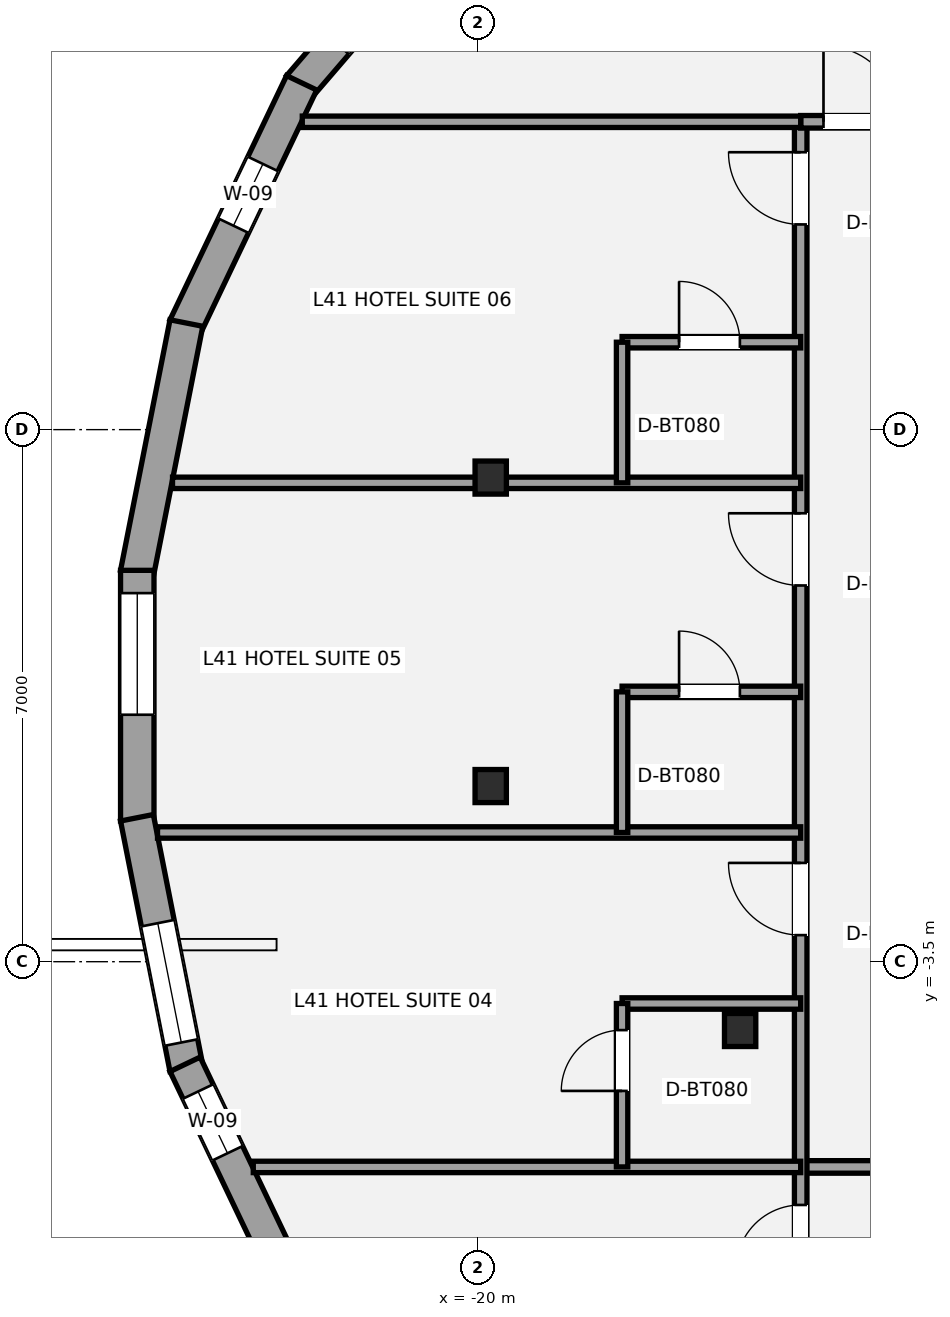
"""IFC4 building model, lengths in metres.
Left out: names, types, materials, properties, quantities, classifications, styles, units other than length and angle.
Written with IfcOpenShell. Run it as: python <this file> out.ifc"""

import sys

from ifc_helpers import new_model, si_unit, direction, frame, frame_2d, origin, origin_2d, place, context, subcontext, project, spatial, rectangle, i_section, extrude, element, fill, save


model = new_model("IFC4")
c1 = context("Model", 3, precision=1e-05, world=origin(), true_north=direction((0.0, 1.0)))
c2 = subcontext(c1, "Body", "Model", "MODEL_VIEW")
j1 = project(units=[si_unit("LENGTHUNIT", "METRE"), si_unit("PLANEANGLEUNIT", "RADIAN")], contexts=[c1])
p1 = place(None, origin())
s1 = spatial("IfcSite", under=j1, at=p1, CompositionType="ELEMENT")
p2 = place(p1, origin())
s2 = spatial("IfcBuilding", under=s1, at=p2, CompositionType="ELEMENT")
p3 = place(p2, frame((0.0, 0.0, 153.4)))
s3 = spatial("IfcBuildingStorey", under=s2, at=p3, CompositionType="ELEMENT", Elevation=153.4)
for number, where, z_axis, x_axis in (
    (1, (-19.828, 2.869, 0.0), (0.0, 0.0, 1.0), (1.0, 0.0, 0.0)),
    (2, (-19.828, -1.189, 0.0), (0.0, 0.0, 1.0), (1.0, 0.0, 0.0)),
    (3, (-16.547, -4.398, 0.0), (0.0, 0.0, 1.0), (1.0, 0.0, 0.0)),
):
    element("IfcColumn", number, at=place(p3, frame(where, z_axis=z_axis, x_axis=x_axis)), inside=s3, PredefinedType="COLUMN", context=c2, shape_type="SweptSolid", body=[
        extrude(i_section(OverallWidth=0.412, OverallDepth=0.435, WebThickness=0.036, FlangeThickness=0.057, at=origin_2d()), origin(), (0.0, 0.0, 1.0), 3.2),
    ])
p4 = place(p3, frame((-22.347, 8.014, 0.0), z_axis=(0.0, 0.0, 1.0), x_axis=(0.651797156524, 0.758393345664, 0.0)))
e4 = element("IfcWall", 4, at=p4, inside=s3, PredefinedType="STANDARD", context=c2, shape_type="SweptSolid", body=[
    extrude(rectangle(XDim=3.896, YDim=0.44, at=frame_2d((1.948, 0.0))), origin(), (0.0, 0.0, 1.0), 2.315),
])
p5 = place(p4, frame((0.749, 0.0, 0.58)))
e5 = element("IfcOpeningElement", 5, at=p5, cuts=e4, PredefinedType="OPENING", context=c2, shape_type="SweptSolid", body=[
    extrude(rectangle(XDim=1.6, YDim=1.55, at=frame_2d((0.8, 0.775))), frame((0.0, 0.23, 0.0), z_axis=(0.0, -1.0, 0.0), x_axis=(1.0, 0.0, 0.0)), (0.0, 0.0, 1.0), 0.46),
])
p6 = place(p3, frame((-23.85, 4.85, 0.0), z_axis=(0.0, 0.0, 1.0), x_axis=(0.430899691529, 0.902399831472, 0.0)))
e6 = element("IfcWall", 6, at=p6, inside=s3, PredefinedType="STANDARD", context=c2, shape_type="SweptSolid", body=[
    extrude(rectangle(XDim=3.56, YDim=0.44, at=frame_2d((1.78, 0.0))), origin(), (0.0, 0.0, 1.0), 2.315),
])
p7 = place(p6, frame((1.477, 0.0, 0.58)))
e7 = element("IfcOpeningElement", 7, at=p7, cuts=e6, PredefinedType="OPENING", context=c2, shape_type="SweptSolid", body=[
    extrude(rectangle(XDim=0.9, YDim=1.35, at=frame_2d((0.45, 0.675))), frame((0.0, 0.23, 0.0), z_axis=(0.0, -1.0, 0.0), x_axis=(1.0, 0.0, 0.0)), (0.0, 0.0, 1.0), 0.46),
])
p8 = place(p3, frame((-24.483, 1.606, 0.0), z_axis=(0.0, 0.0, 1.0), x_axis=(0.193669845908, 0.981066761635, 0.0)))
e8 = element("IfcWall", 8, at=p8, inside=s3, PredefinedType="STANDARD", context=c2, shape_type="SweptSolid", body=[
    extrude(rectangle(XDim=3.36, YDim=0.44, at=frame_2d((1.68, 0.0))), origin(), (0.0, 0.0, 1.0), 2.315),
])
p9 = place(p3, frame((-24.479, -1.649, 0.0), z_axis=(0.0, 0.0, 1.0), x_axis=(0.0, 1.0, 0.0)))
e9 = element("IfcWall", 9, at=p9, inside=s3, PredefinedType="STANDARD", context=c2, shape_type="SweptSolid", body=[
    extrude(rectangle(XDim=3.298, YDim=0.44, at=frame_2d((1.649, 0.0))), origin(), (0.0, 0.0, 1.0), 2.315),
])
p10 = place(p9, frame((1.398, 0.0, 0.58)))
e10 = element("IfcOpeningElement", 10, at=p10, cuts=e9, PredefinedType="OPENING", context=c2, shape_type="SweptSolid", body=[
    extrude(rectangle(XDim=1.6, YDim=1.55, at=frame_2d((0.8, 0.775))), frame((0.0, 0.23, 0.0), z_axis=(0.0, -1.0, 0.0), x_axis=(1.0, 0.0, 0.0)), (0.0, 0.0, 1.0), 0.46),
])
p11 = place(p3, frame((-23.832, -4.902, 0.0), z_axis=(0.0, 0.0, 1.0), x_axis=(-0.193669845908, 0.981066761635, 0.0)))
e11 = element("IfcWall", 11, at=p11, inside=s3, PredefinedType="STANDARD", context=c2, shape_type="SweptSolid", body=[
    extrude(rectangle(XDim=3.36, YDim=0.44, at=frame_2d((1.68, 0.0))), origin(), (0.0, 0.0, 1.0), 2.315),
])
p12 = place(p11, frame((0.346, 0.0, 0.58)))
e12 = element("IfcOpeningElement", 12, at=p12, cuts=e11, PredefinedType="OPENING", context=c2, shape_type="SweptSolid", body=[
    extrude(rectangle(XDim=1.6, YDim=1.55, at=frame_2d((0.8, 0.775))), frame((0.0, 0.23, 0.0), z_axis=(0.0, -1.0, 0.0), x_axis=(1.0, 0.0, 0.0)), (0.0, 0.0, 1.0), 0.46),
])
p13 = place(p3, frame((-22.316, -8.062, 0.0), z_axis=(0.0, 0.0, 1.0), x_axis=(-0.430899691529, 0.902399831472, 0.0)))
e13 = element("IfcWall", 13, at=p13, inside=s3, PredefinedType="STANDARD", context=c2, shape_type="SweptSolid", body=[
    extrude(rectangle(XDim=3.56, YDim=0.44, at=frame_2d((1.78, 0.0))), origin(), (0.0, 0.0, 1.0), 2.315),
])
p14 = place(p13, frame((2.263, 0.0, 0.58)))
e14 = element("IfcOpeningElement", 14, at=p14, cuts=e13, PredefinedType="OPENING", context=c2, shape_type="SweptSolid", body=[
    extrude(rectangle(XDim=0.9, YDim=1.35, at=frame_2d((0.45, 0.675))), frame((0.0, 0.23, 0.0), z_axis=(0.0, -1.0, 0.0), x_axis=(1.0, 0.0, 0.0)), (0.0, 0.0, 1.0), 0.46),
])
p15 = place(p3, frame((-15.75, -6.2, 0.0), z_axis=(0.0, 0.0, 1.0), x_axis=(1.0, 0.0, 0.0)))
e15 = element("IfcWall", 15, at=p15, inside=s3, PredefinedType="PARTITIONING", context=c2, shape_type="SweptSolid", body=[
    extrude(rectangle(XDim=31.3, YDim=0.165, at=frame_2d((15.65, 0.0))), origin(), (0.0, 0.0, 1.0), 2.398),
])
p16 = place(p15, frame((8.12, 0.0, 0.0)))
e16 = element("IfcOpeningElement", 16, at=p16, cuts=e15, PredefinedType="OPENING", context=c2, shape_type="SweptSolid", body=[
    extrude(rectangle(XDim=0.95, YDim=2.15, at=frame_2d((0.475, 1.075))), frame((0.0, 0.093, 0.0), z_axis=(0.0, -1.0, 0.0), x_axis=(1.0, 0.0, 0.0)), (0.0, 0.0, 1.0), 0.185),
])
p17 = place(p15, frame((19.6, 0.0, 0.0)))
e17 = element("IfcOpeningElement", 17, at=p17, cuts=e15, PredefinedType="OPENING", context=c2, shape_type="SweptSolid", body=[
    extrude(rectangle(XDim=0.95, YDim=2.15, at=frame_2d((0.475, 1.075))), frame((0.0, 0.093, 0.0), z_axis=(0.0, -1.0, 0.0), x_axis=(1.0, 0.0, 0.0)), (0.0, 0.0, 1.0), 0.185),
])
p18 = place(p15, frame((29.95, 0.0, 0.0)))
e18 = element("IfcOpeningElement", 18, at=p18, cuts=e15, PredefinedType="OPENING", context=c2, shape_type="SweptSolid", body=[
    extrude(rectangle(XDim=0.95, YDim=2.15, at=frame_2d((0.475, 1.075))), frame((0.0, 0.093, 0.0), z_axis=(0.0, -1.0, 0.0), x_axis=(1.0, 0.0, 0.0)), (0.0, 0.0, 1.0), 0.185),
])
p19 = place(p3, frame((-15.75, -13.312, 0.0), z_axis=(0.0, 0.0, 1.0), x_axis=(0.0, 1.0, 0.0)))
e19 = element("IfcWall", 19, at=p19, inside=s3, PredefinedType="PARTITIONING", context=c2, shape_type="SweptSolid", body=[
    extrude(rectangle(XDim=20.862, YDim=0.165, at=frame_2d((10.431, 0.0))), origin(), (0.0, 0.0, 1.0), 2.473),
])
p20 = place(p19, frame((5.762, 0.0, 0.0)))
e20 = element("IfcOpeningElement", 20, at=p20, cuts=e19, PredefinedType="OPENING", context=c2, shape_type="SweptSolid", body=[
    extrude(rectangle(XDim=0.85, YDim=2.1, at=frame_2d((0.425, 1.05))), frame((0.0, 0.093, 0.0), z_axis=(0.0, -1.0, 0.0), x_axis=(1.0, 0.0, 0.0)), (0.0, 0.0, 1.0), 0.185),
])
p21 = place(p19, frame((10.162, 0.0, 0.0)))
e21 = element("IfcOpeningElement", 21, at=p21, cuts=e19, PredefinedType="OPENING", context=c2, shape_type="SweptSolid", body=[
    extrude(rectangle(XDim=0.95, YDim=2.15, at=frame_2d((0.475, 1.075))), frame((0.0, 0.093, 0.0), z_axis=(0.0, -1.0, 0.0), x_axis=(1.0, 0.0, 0.0)), (0.0, 0.0, 1.0), 0.185),
])
p22 = place(p19, frame((14.762, 0.0, 0.0)))
e22 = element("IfcOpeningElement", 22, at=p22, cuts=e19, PredefinedType="OPENING", context=c2, shape_type="SweptSolid", body=[
    extrude(rectangle(XDim=0.95, YDim=2.15, at=frame_2d((0.475, 1.075))), frame((0.0, 0.093, 0.0), z_axis=(0.0, -1.0, 0.0), x_axis=(1.0, 0.0, 0.0)), (0.0, 0.0, 1.0), 0.185),
])
p23 = place(p19, frame((19.512, 0.0, 0.0)))
e23 = element("IfcOpeningElement", 23, at=p23, cuts=e19, PredefinedType="OPENING", context=c2, shape_type="SweptSolid", body=[
    extrude(rectangle(XDim=0.95, YDim=2.15, at=frame_2d((0.475, 1.075))), frame((0.0, 0.093, 0.0), z_axis=(0.0, -1.0, 0.0), x_axis=(1.0, 0.0, 0.0)), (0.0, 0.0, 1.0), 0.185),
])
p24 = place(p3, frame((-15.75, 7.55, 0.0), z_axis=(0.0, 0.0, 1.0), x_axis=(1.0, 0.0, 0.0)))
e24 = element("IfcWall", 24, at=p24, inside=s3, PredefinedType="PARTITIONING", context=c2, shape_type="SweptSolid", body=[
    extrude(rectangle(XDim=1.95, YDim=0.165, at=frame_2d((0.975, 0.0))), origin(), (0.0, 0.0, 1.0), 3.02),
])
p25 = place(p24, frame((0.3, 0.0, 0.0)))
e25 = element("IfcOpeningElement", 25, at=p25, cuts=e24, PredefinedType="OPENING", context=c2, shape_type="SweptSolid", body=[
    extrude(rectangle(XDim=1.0, YDim=2.15, at=frame_2d((0.5, 1.075))), frame((0.0, 0.093, 0.0), z_axis=(0.0, -1.0, 0.0), x_axis=(1.0, 0.0, 0.0)), (0.0, 0.0, 1.0), 0.185),
])
p26 = place(p3, frame((-22.308, 7.55, 0.0), z_axis=(0.0, 0.0, 1.0), x_axis=(1.0, 0.0, 0.0)))
e26 = element("IfcWall", 26, at=p26, inside=s3, PredefinedType="PLUMBINGWALL", context=c2, shape_type="SweptSolid", body=[
    extrude(rectangle(XDim=6.558, YDim=0.15, at=frame_2d((3.279, 0.0))), origin(), (0.0, 0.0, 1.0), 2.473),
])
p27 = place(p3, frame((-22.952, -6.2, 0.0), z_axis=(0.0, 0.0, 1.0), x_axis=(1.0, 0.0, 0.0)))
e27 = element("IfcWall", 27, at=p27, inside=s3, PredefinedType="PLUMBINGWALL", context=c2, shape_type="SweptSolid", body=[
    extrude(rectangle(XDim=7.202, YDim=0.15, at=frame_2d((3.601, 0.0))), origin(), (0.0, 0.0, 1.0), 2.473),
])
p28 = place(p3, frame((-24.212, -1.8, 0.0), z_axis=(0.0, 0.0, 1.0), x_axis=(1.0, 0.0, 0.0)))
e28 = element("IfcWall", 28, at=p28, inside=s3, PredefinedType="PLUMBINGWALL", context=c2, shape_type="SweptSolid", body=[
    extrude(rectangle(XDim=8.462, YDim=0.15, at=frame_2d((4.231, 0.0))), origin(), (0.0, 0.0, 1.0), 2.398),
])
p29 = place(p3, frame((-24.015, 2.8, 0.0), z_axis=(0.0, 0.0, 1.0), x_axis=(1.0, 0.0, 0.0)))
e29 = element("IfcWall", 29, at=p29, inside=s3, PredefinedType="PLUMBINGWALL", context=c2, shape_type="SweptSolid", body=[
    extrude(rectangle(XDim=8.265, YDim=0.15, at=frame_2d((4.132, 0.0))), origin(), (0.0, 0.0, 1.0), 2.473),
])
p30 = place(p3, frame((-18.1, -4.05, 0.0), z_axis=(0.0, 0.0, 1.0), x_axis=(1.0, 0.0, 0.0)))
e30 = element("IfcWall", 30, at=p30, inside=s3, PredefinedType="PLUMBINGWALL", context=c2, shape_type="SweptSolid", body=[
    extrude(rectangle(XDim=2.35, YDim=0.15, at=frame_2d((1.175, 0.0))), origin(), (0.0, 0.0, 1.0), 2.398),
])
p31 = place(p3, frame((-18.1, -6.2, 0.0), z_axis=(0.0, 0.0, 1.0), x_axis=(0.0, 1.0, 0.0)))
e31 = element("IfcWall", 31, at=p31, inside=s3, PredefinedType="PLUMBINGWALL", context=c2, shape_type="SweptSolid", body=[
    extrude(rectangle(XDim=2.15, YDim=0.15, at=frame_2d((1.075, 0.0))), origin(), (0.0, 0.0, 1.0), 3.02),
])
p32 = place(p31, frame((1.0, 0.0, 0.0)))
e32 = element("IfcOpeningElement", 32, at=p32, cuts=e31, PredefinedType="OPENING", context=c2, shape_type="SweptSolid", body=[
    extrude(rectangle(XDim=0.8, YDim=2.1, at=frame_2d((0.4, 1.05))), frame((0.0, 0.085, 0.0), z_axis=(0.0, -1.0, 0.0), x_axis=(1.0, 0.0, 0.0)), (0.0, 0.0, 1.0), 0.17),
])
p33 = place(p3, frame((-18.1, 0.05, 0.0), z_axis=(0.0, 0.0, 1.0), x_axis=(1.0, 0.0, 0.0)))
e33 = element("IfcWall", 33, at=p33, inside=s3, PredefinedType="PLUMBINGWALL", context=c2, shape_type="SweptSolid", body=[
    extrude(rectangle(XDim=2.35, YDim=0.15, at=frame_2d((1.175, 0.0))), origin(), (0.0, 0.0, 1.0), 2.473),
])
p34 = place(p33, frame((0.75, 0.0, 0.0)))
e34 = element("IfcOpeningElement", 34, at=p34, cuts=e33, PredefinedType="OPENING", context=c2, shape_type="SweptSolid", body=[
    extrude(rectangle(XDim=0.8, YDim=2.1, at=frame_2d((0.4, 1.05))), frame((0.0, 0.085, 0.0), z_axis=(0.0, -1.0, 0.0), x_axis=(1.0, 0.0, 0.0)), (0.0, 0.0, 1.0), 0.17),
])
p35 = place(p3, frame((-18.1, -1.8, 0.0), z_axis=(0.0, 0.0, 1.0), x_axis=(0.0, 1.0, 0.0)))
e35 = element("IfcWall", 35, at=p35, inside=s3, PredefinedType="PLUMBINGWALL", context=c2, shape_type="SweptSolid", body=[
    extrude(rectangle(XDim=1.85, YDim=0.15, at=frame_2d((0.925, 0.0))), origin(), (0.0, 0.0, 1.0), 3.02),
])
p36 = place(p3, frame((-18.1, 4.65, 0.0), z_axis=(0.0, 0.0, 1.0), x_axis=(1.0, 0.0, 0.0)))
e36 = element("IfcWall", 36, at=p36, inside=s3, PredefinedType="PLUMBINGWALL", context=c2, shape_type="SweptSolid", body=[
    extrude(rectangle(XDim=2.35, YDim=0.15, at=frame_2d((1.175, 0.0))), origin(), (0.0, 0.0, 1.0), 3.02),
])
p37 = place(p36, frame((0.75, 0.0, 0.0)))
e37 = element("IfcOpeningElement", 37, at=p37, cuts=e36, PredefinedType="OPENING", context=c2, shape_type="SweptSolid", body=[
    extrude(rectangle(XDim=0.8, YDim=2.1, at=frame_2d((0.4, 1.05))), frame((0.0, 0.085, 0.0), z_axis=(0.0, -1.0, 0.0), x_axis=(1.0, 0.0, 0.0)), (0.0, 0.0, 1.0), 0.17),
])
p38 = place(p3, frame((-18.1, 2.8, 0.0), z_axis=(0.0, 0.0, 1.0), x_axis=(0.0, 1.0, 0.0)))
e38 = element("IfcWall", 38, at=p38, inside=s3, PredefinedType="PLUMBINGWALL", context=c2, shape_type="SweptSolid", body=[
    extrude(rectangle(XDim=1.85, YDim=0.15, at=frame_2d((0.925, 0.0))), origin(), (0.0, 0.0, 1.0), 3.02),
])
p39 = place(p7, origin())
e39 = element("IfcWindow", 39, at=p39, inside=s3, PartitioningType="SINGLE_PANEL", PredefinedType="WINDOW", context=c2, shape_type="SweptSolid", body=[
    extrude(rectangle(XDim=0.9, YDim=1.35, at=frame_2d((0.45, 0.675))), frame((0.0, -0.01, 0.0), z_axis=(0.0, -1.0, 0.0), x_axis=(1.0, 0.0, 0.0)), (0.0, 0.0, 1.0), 0.06),
])
fill(e7, e39)
p40 = place(p10, origin())
e40 = element("IfcWindow", 40, at=p40, inside=s3, PartitioningType="SINGLE_PANEL", PredefinedType="WINDOW", context=c2, shape_type="SweptSolid", body=[
    extrude(rectangle(XDim=1.6, YDim=1.55, at=frame_2d((0.8, 0.775))), frame((0.0, -0.01, 0.0), z_axis=(0.0, -1.0, 0.0), x_axis=(1.0, 0.0, 0.0)), (0.0, 0.0, 1.0), 0.06),
])
fill(e10, e40)
p41 = place(p12, origin())
e41 = element("IfcWindow", 41, at=p41, inside=s3, PartitioningType="SINGLE_PANEL", PredefinedType="WINDOW", context=c2, shape_type="SweptSolid", body=[
    extrude(rectangle(XDim=1.6, YDim=1.55, at=frame_2d((0.8, 0.775))), frame((0.0, -0.01, 0.0), z_axis=(0.0, -1.0, 0.0), x_axis=(1.0, 0.0, 0.0)), (0.0, 0.0, 1.0), 0.06),
])
fill(e12, e41)
p42 = place(p14, origin())
e42 = element("IfcWindow", 42, at=p42, inside=s3, PartitioningType="SINGLE_PANEL", PredefinedType="WINDOW", context=c2, shape_type="SweptSolid", body=[
    extrude(rectangle(XDim=0.9, YDim=1.35, at=frame_2d((0.45, 0.675))), frame((0.0, -0.01, 0.0), z_axis=(0.0, -1.0, 0.0), x_axis=(1.0, 0.0, 0.0)), (0.0, 0.0, 1.0), 0.06),
])
fill(e14, e42)
p43 = place(p25, origin())
e43 = element("IfcDoor", 43, at=p43, inside=s3, OperationType="SINGLE_SWING_LEFT", PredefinedType="DOOR", context=c2, shape_type="SweptSolid", body=[
    extrude(rectangle(XDim=1.0, YDim=2.15, at=frame_2d((0.5, 1.075))), frame((0.0, 0.025, 0.0), z_axis=(0.0, -1.0, 0.0), x_axis=(1.0, 0.0, 0.0)), (0.0, 0.0, 1.0), 0.05),
])
fill(e25, e43)
p44 = place(p20, origin())
e44 = element("IfcDoor", 44, at=p44, inside=s3, OperationType="SINGLE_SWING_LEFT", PredefinedType="DOOR", context=c2, shape_type="SweptSolid", body=[
    extrude(rectangle(XDim=0.85, YDim=2.1, at=frame_2d((0.425, 1.05))), frame((0.0, 0.025, 0.0), z_axis=(0.0, -1.0, 0.0), x_axis=(1.0, 0.0, 0.0)), (0.0, 0.0, 1.0), 0.05),
])
fill(e20, e44)
p45 = place(p21, origin())
e45 = element("IfcDoor", 45, at=p45, inside=s3, OperationType="SINGLE_SWING_RIGHT", PredefinedType="DOOR", context=c2, shape_type="SweptSolid", body=[
    extrude(rectangle(XDim=0.95, YDim=2.15, at=frame_2d((0.475, 1.075))), frame((0.0, 0.025, 0.0), z_axis=(0.0, -1.0, 0.0), x_axis=(1.0, 0.0, 0.0)), (0.0, 0.0, 1.0), 0.05),
])
fill(e21, e45)
p46 = place(p32, origin())
e46 = element("IfcDoor", 46, at=p46, inside=s3, OperationType="SINGLE_SWING_LEFT", PredefinedType="DOOR", context=c2, shape_type="SweptSolid", body=[
    extrude(rectangle(XDim=0.8, YDim=2.1, at=frame_2d((0.4, 1.05))), frame((0.0, 0.025, 0.0), z_axis=(0.0, -1.0, 0.0), x_axis=(1.0, 0.0, 0.0)), (0.0, 0.0, 1.0), 0.05),
])
fill(e32, e46)
p47 = place(p22, origin())
e47 = element("IfcDoor", 47, at=p47, inside=s3, OperationType="SINGLE_SWING_RIGHT", PredefinedType="DOOR", context=c2, shape_type="SweptSolid", body=[
    extrude(rectangle(XDim=0.95, YDim=2.15, at=frame_2d((0.475, 1.075))), frame((0.0, 0.025, 0.0), z_axis=(0.0, -1.0, 0.0), x_axis=(1.0, 0.0, 0.0)), (0.0, 0.0, 1.0), 0.05),
])
fill(e22, e47)
p48 = place(p34, origin())
e48 = element("IfcDoor", 48, at=p48, inside=s3, OperationType="SINGLE_SWING_LEFT", PredefinedType="DOOR", context=c2, shape_type="SweptSolid", body=[
    extrude(rectangle(XDim=0.8, YDim=2.1, at=frame_2d((0.4, 1.05))), frame((0.0, 0.025, 0.0), z_axis=(0.0, -1.0, 0.0), x_axis=(1.0, 0.0, 0.0)), (0.0, 0.0, 1.0), 0.05),
])
fill(e34, e48)
p49 = place(p23, origin())
e49 = element("IfcDoor", 49, at=p49, inside=s3, OperationType="SINGLE_SWING_RIGHT", PredefinedType="DOOR", context=c2, shape_type="SweptSolid", body=[
    extrude(rectangle(XDim=0.95, YDim=2.15, at=frame_2d((0.475, 1.075))), frame((0.0, 0.025, 0.0), z_axis=(0.0, -1.0, 0.0), x_axis=(1.0, 0.0, 0.0)), (0.0, 0.0, 1.0), 0.05),
])
fill(e23, e49)
p50 = place(p37, origin())
e50 = element("IfcDoor", 50, at=p50, inside=s3, OperationType="SINGLE_SWING_LEFT", PredefinedType="DOOR", context=c2, shape_type="SweptSolid", body=[
    extrude(rectangle(XDim=0.8, YDim=2.1, at=frame_2d((0.4, 1.05))), frame((0.0, 0.025, 0.0), z_axis=(0.0, -1.0, 0.0), x_axis=(1.0, 0.0, 0.0)), (0.0, 0.0, 1.0), 0.05),
])
fill(e37, e50)
save(model, sys.argv[1])
